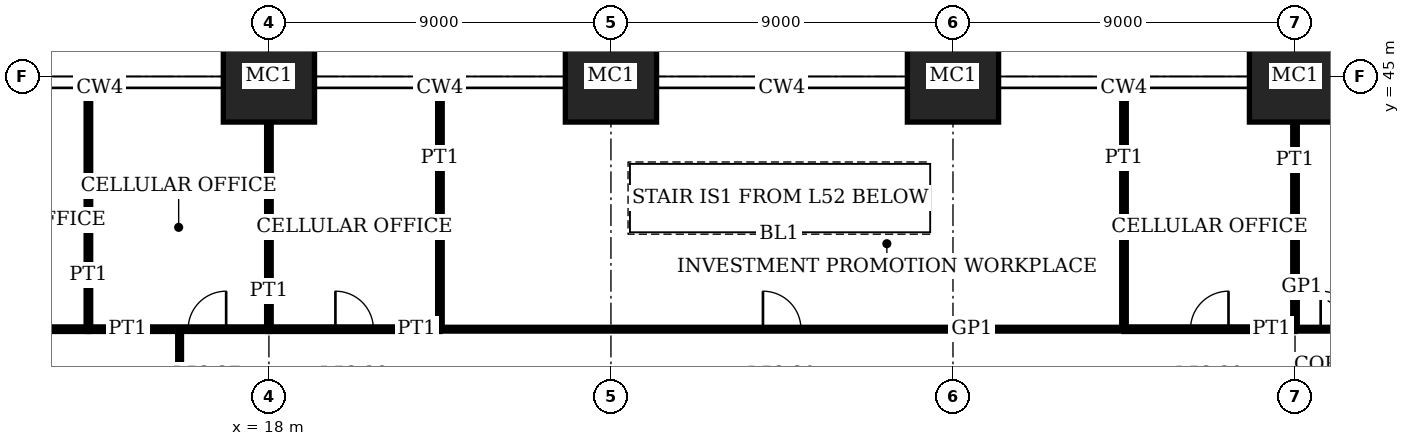
"""IFC4 building model, lengths in metres.
Left out: names, types, materials, properties, quantities, classifications, styles, units other than length and angle.
Written with IfcOpenShell. Run it as: python <this file> out.ifc"""

import sys

from ifc_helpers import new_model, si_unit, direction, frame, frame_2d, origin, origin_2d, place, context, subcontext, project, spatial, rectangle, extrude, element, fill, save


model = new_model("IFC4")
c1 = context("Model", 3, precision=1e-05, world=origin(), true_north=direction((0.0, 1.0)))
c2 = subcontext(c1, "Body", "Model", "MODEL_VIEW")
j1 = project(units=[si_unit("LENGTHUNIT", "METRE"), si_unit("PLANEANGLEUNIT", "RADIAN")], contexts=[c1])
p1 = place(None, origin())
s1 = spatial("IfcSite", under=j1, at=p1, CompositionType="ELEMENT")
p2 = place(p1, origin())
s2 = spatial("IfcBuilding", under=s1, at=p2, CompositionType="ELEMENT")
p3 = place(p2, frame((0.0, 0.0, 218.2)))
s3 = spatial("IfcBuildingStorey", under=s2, at=p3, CompositionType="ELEMENT", Elevation=218.2)
for number, where, z_axis, x_axis in (
    (1, (18.0, 45.0, 0.0), (0.0, 0.0, 1.0), (1.0, 0.0, 0.0)),
    (2, (27.0, 45.0, 0.0), (0.0, 0.0, 1.0), (1.0, 0.0, 0.0)),
    (3, (36.0, 45.0, 0.0), (0.0, 0.0, 1.0), (1.0, 0.0, 0.0)),
    (4, (45.0, 45.0, 0.0), (0.0, 0.0, 1.0), (1.0, 0.0, 0.0)),
):
    element("IfcColumn", number, at=place(p3, frame(where, z_axis=z_axis, x_axis=x_axis)), inside=s3, PredefinedType="COLUMN", context=c2, shape_type="SweptSolid", body=[
        extrude(rectangle(XDim=2.4, YDim=2.4, at=origin_2d()), origin(), (0.0, 0.0, 1.0), 4.0),
    ])
p4 = place(p3, frame((9.0, 38.35, 0.0), z_axis=(0.0, 0.0, 1.0), x_axis=(1.0, 0.0, 0.0)))
e5 = element("IfcWall", 5, at=p4, inside=s3, PredefinedType="PARTITIONING", context=c2, shape_type="SweptSolid", body=[
    extrude(rectangle(XDim=4.25, YDim=0.12, at=frame_2d((2.125, 0.0))), origin(), (0.0, 0.0, 1.0), 3.75),
])
p5 = place(p4, frame((1.625, 0.0, 0.0)))
e6 = element("IfcOpeningElement", 6, at=p5, cuts=e5, PredefinedType="OPENING", context=c2, shape_type="SweptSolid", body=[
    extrude(rectangle(XDim=1.0, YDim=2.4, at=frame_2d((0.5, 1.2))), frame((0.0, 0.07, 0.0), z_axis=(0.0, -1.0, 0.0), x_axis=(1.0, 0.0, 0.0)), (0.0, 0.0, 1.0), 0.14),
])
p6 = place(p3, frame((13.25, 38.35, 0.0), z_axis=(0.0, 0.0, 1.0), x_axis=(1.0, 0.0, 0.0)))
e7 = element("IfcWall", 7, at=p6, inside=s3, PredefinedType="PARTITIONING", context=c2, shape_type="SweptSolid", body=[
    extrude(rectangle(XDim=4.75, YDim=0.12, at=frame_2d((2.375, 0.0))), origin(), (0.0, 0.0, 1.0), 3.75),
])
p7 = place(p6, frame((2.625, 0.0, 0.0)))
e8 = element("IfcOpeningElement", 8, at=p7, cuts=e7, PredefinedType="OPENING", context=c2, shape_type="SweptSolid", body=[
    extrude(rectangle(XDim=1.0, YDim=2.4, at=frame_2d((0.5, 1.2))), frame((0.0, 0.07, 0.0), z_axis=(0.0, -1.0, 0.0), x_axis=(1.0, 0.0, 0.0)), (0.0, 0.0, 1.0), 0.14),
])
p8 = place(p3, frame((18.0, 38.35, 0.0), z_axis=(0.0, 0.0, 1.0), x_axis=(1.0, 0.0, 0.0)))
e9 = element("IfcWall", 9, at=p8, inside=s3, PredefinedType="PARTITIONING", context=c2, shape_type="SweptSolid", body=[
    extrude(rectangle(XDim=4.5, YDim=0.12, at=frame_2d((2.25, 0.0))), origin(), (0.0, 0.0, 1.0), 3.75),
])
p9 = place(p8, frame((1.75, 0.0, 0.0)))
e10 = element("IfcOpeningElement", 10, at=p9, cuts=e9, PredefinedType="OPENING", context=c2, shape_type="SweptSolid", body=[
    extrude(rectangle(XDim=1.0, YDim=2.4, at=frame_2d((0.5, 1.2))), frame((0.0, 0.07, 0.0), z_axis=(0.0, -1.0, 0.0), x_axis=(1.0, 0.0, 0.0)), (0.0, 0.0, 1.0), 0.14),
])
p10 = place(p3, frame((40.5, 38.35, 0.0), z_axis=(0.0, 0.0, 1.0), x_axis=(1.0, 0.0, 0.0)))
e11 = element("IfcWall", 11, at=p10, inside=s3, PredefinedType="PARTITIONING", context=c2, shape_type="SweptSolid", body=[
    extrude(rectangle(XDim=4.5, YDim=0.12, at=frame_2d((2.25, 0.0))), origin(), (0.0, 0.0, 1.0), 3.75),
])
p11 = place(p10, frame((1.75, 0.0, 0.0)))
e12 = element("IfcOpeningElement", 12, at=p11, cuts=e11, PredefinedType="OPENING", context=c2, shape_type="SweptSolid", body=[
    extrude(rectangle(XDim=1.0, YDim=2.4, at=frame_2d((0.5, 1.2))), frame((0.0, 0.07, 0.0), z_axis=(0.0, -1.0, 0.0), x_axis=(1.0, 0.0, 0.0)), (0.0, 0.0, 1.0), 0.14),
])
p12 = place(p3, frame((22.5, 38.35, 0.0), z_axis=(0.0, 0.0, 1.0), x_axis=(1.0, 0.0, 0.0)))
e13 = element("IfcWall", 13, at=p12, inside=s3, PredefinedType="PARTITIONING", context=c2, shape_type="SweptSolid", body=[
    extrude(rectangle(XDim=18.0, YDim=0.1, at=frame_2d((9.0, 0.0))), origin(), (0.0, 0.0, 1.0), 3.75),
])
p13 = place(p12, frame((8.5, 0.0, 0.0)))
e14 = element("IfcOpeningElement", 14, at=p13, cuts=e13, PredefinedType="OPENING", context=c2, shape_type="SweptSolid", body=[
    extrude(rectangle(XDim=1.0, YDim=2.4, at=frame_2d((0.5, 1.2))), frame((0.0, 0.06, 0.0), z_axis=(0.0, -1.0, 0.0), x_axis=(1.0, 0.0, 0.0)), (0.0, 0.0, 1.0), 0.12),
])
p14 = place(p3, frame((45.0, 38.35, 0.0), z_axis=(0.0, 0.0, 1.0), x_axis=(1.0, 0.0, 0.0)))
e15 = element("IfcWall", 15, at=p14, inside=s3, PredefinedType="PARTITIONING", context=c2, shape_type="SweptSolid", body=[
    extrude(rectangle(XDim=2.35, YDim=0.1, at=frame_2d((1.175, 0.0))), origin(), (0.0, 0.0, 1.0), 3.75),
])
p15 = place(p14, frame((0.675, 0.0, 0.0)))
e16 = element("IfcOpeningElement", 16, at=p15, cuts=e15, PredefinedType="OPENING", context=c2, shape_type="SweptSolid", body=[
    extrude(rectangle(XDim=1.0, YDim=2.4, at=frame_2d((0.5, 1.2))), frame((0.0, 0.06, 0.0), z_axis=(0.0, -1.0, 0.0), x_axis=(1.0, 0.0, 0.0)), (0.0, 0.0, 1.0), 0.12),
])
p16 = place(p3, frame((13.25, 38.35, 0.0), z_axis=(0.0, 0.0, 1.0), x_axis=(0.0, 1.0, 0.0)))
e17 = element("IfcWall", 17, at=p16, inside=s3, PredefinedType="PARTITIONING", context=c2, shape_type="SweptSolid", body=[
    extrude(rectangle(XDim=6.34, YDim=0.12, at=frame_2d((3.17, 0.0))), origin(), (0.0, 0.0, 1.0), 3.75),
])
p17 = place(p3, frame((15.65, 27.0, 0.0), z_axis=(0.0, 0.0, 1.0), x_axis=(0.0, 1.0, 0.0)))
e18 = element("IfcWall", 18, at=p17, inside=s3, PredefinedType="PARTITIONING", context=c2, shape_type="SweptSolid", body=[
    extrude(rectangle(XDim=11.35, YDim=0.1, at=frame_2d((5.675, 0.0))), origin(), (0.0, 0.0, 1.0), 3.75),
])
p18 = place(p3, frame((18.0, 38.35, 0.0), z_axis=(0.0, 0.0, 1.0), x_axis=(0.0, 1.0, 0.0)))
e19 = element("IfcWall", 19, at=p18, inside=s3, PredefinedType="PARTITIONING", context=c2, shape_type="SweptSolid", body=[
    extrude(rectangle(XDim=5.45, YDim=0.12, at=frame_2d((2.725, 0.0))), origin(), (0.0, 0.0, 1.0), 3.05),
])
for number, where, z_axis, x_axis in (
    (20, (22.5, 38.35, 0.0), (0.0, 0.0, 1.0), (0.0, 1.0, 0.0)),
    (21, (40.5, 38.35, 0.0), (0.0, 0.0, 1.0), (0.0, 1.0, 0.0)),
):
    element("IfcWall", number, at=place(p3, frame(where, z_axis=z_axis, x_axis=x_axis)), inside=s3, PredefinedType="PARTITIONING", context=c2, shape_type="SweptSolid", body=[
        extrude(rectangle(XDim=6.34, YDim=0.12, at=frame_2d((3.17, 0.0))), origin(), (0.0, 0.0, 1.0), 3.75),
    ])
p19 = place(p3, frame((45.0, 38.35, 0.0), z_axis=(0.0, 0.0, 1.0), x_axis=(0.0, 1.0, 0.0)))
e22 = element("IfcWall", 22, at=p19, inside=s3, PredefinedType="PARTITIONING", context=c2, shape_type="SweptSolid", body=[
    extrude(rectangle(XDim=5.45, YDim=0.12, at=frame_2d((2.725, 0.0))), origin(), (0.0, 0.0, 1.0), 3.05),
])
p20 = place(p7, origin())
e23 = element("IfcDoor", 23, at=p20, inside=s3, OperationType="SINGLE_SWING_LEFT", PredefinedType="DOOR", context=c2, shape_type="SweptSolid", body=[
    extrude(rectangle(XDim=1.0, YDim=2.4, at=frame_2d((0.5, 1.2))), frame((0.0, 0.025, 0.0), z_axis=(0.0, -1.0, 0.0), x_axis=(1.0, 0.0, 0.0)), (0.0, 0.0, 1.0), 0.05),
])
fill(e8, e23)
p21 = place(p9, origin())
e24 = element("IfcDoor", 24, at=p21, inside=s3, OperationType="SINGLE_SWING_RIGHT", PredefinedType="DOOR", context=c2, shape_type="SweptSolid", body=[
    extrude(rectangle(XDim=1.0, YDim=2.4, at=frame_2d((0.5, 1.2))), frame((0.0, 0.025, 0.0), z_axis=(0.0, -1.0, 0.0), x_axis=(1.0, 0.0, 0.0)), (0.0, 0.0, 1.0), 0.05),
])
fill(e10, e24)
p22 = place(p11, origin())
e25 = element("IfcDoor", 25, at=p22, inside=s3, OperationType="SINGLE_SWING_LEFT", PredefinedType="DOOR", context=c2, shape_type="SweptSolid", body=[
    extrude(rectangle(XDim=1.0, YDim=2.4, at=frame_2d((0.5, 1.2))), frame((0.0, 0.025, 0.0), z_axis=(0.0, -1.0, 0.0), x_axis=(1.0, 0.0, 0.0)), (0.0, 0.0, 1.0), 0.05),
])
fill(e12, e25)
p23 = place(p13, origin())
e26 = element("IfcDoor", 26, at=p23, inside=s3, OperationType="SINGLE_SWING_RIGHT", PredefinedType="DOOR", context=c2, shape_type="SweptSolid", body=[
    extrude(rectangle(XDim=1.0, YDim=2.4, at=frame_2d((0.5, 1.2))), frame((0.0, 0.02, 0.0), z_axis=(0.0, -1.0, 0.0), x_axis=(1.0, 0.0, 0.0)), (0.0, 0.0, 1.0), 0.04),
])
fill(e14, e26)
p24 = place(p15, origin())
e27 = element("IfcDoor", 27, at=p24, inside=s3, OperationType="SINGLE_SWING_RIGHT", PredefinedType="DOOR", context=c2, shape_type="SweptSolid", body=[
    extrude(rectangle(XDim=1.0, YDim=2.4, at=frame_2d((0.5, 1.2))), frame((0.0, 0.02, 0.0), z_axis=(0.0, -1.0, 0.0), x_axis=(1.0, 0.0, 0.0)), (0.0, 0.0, 1.0), 0.04),
])
fill(e16, e27)
save(model, sys.argv[1])
